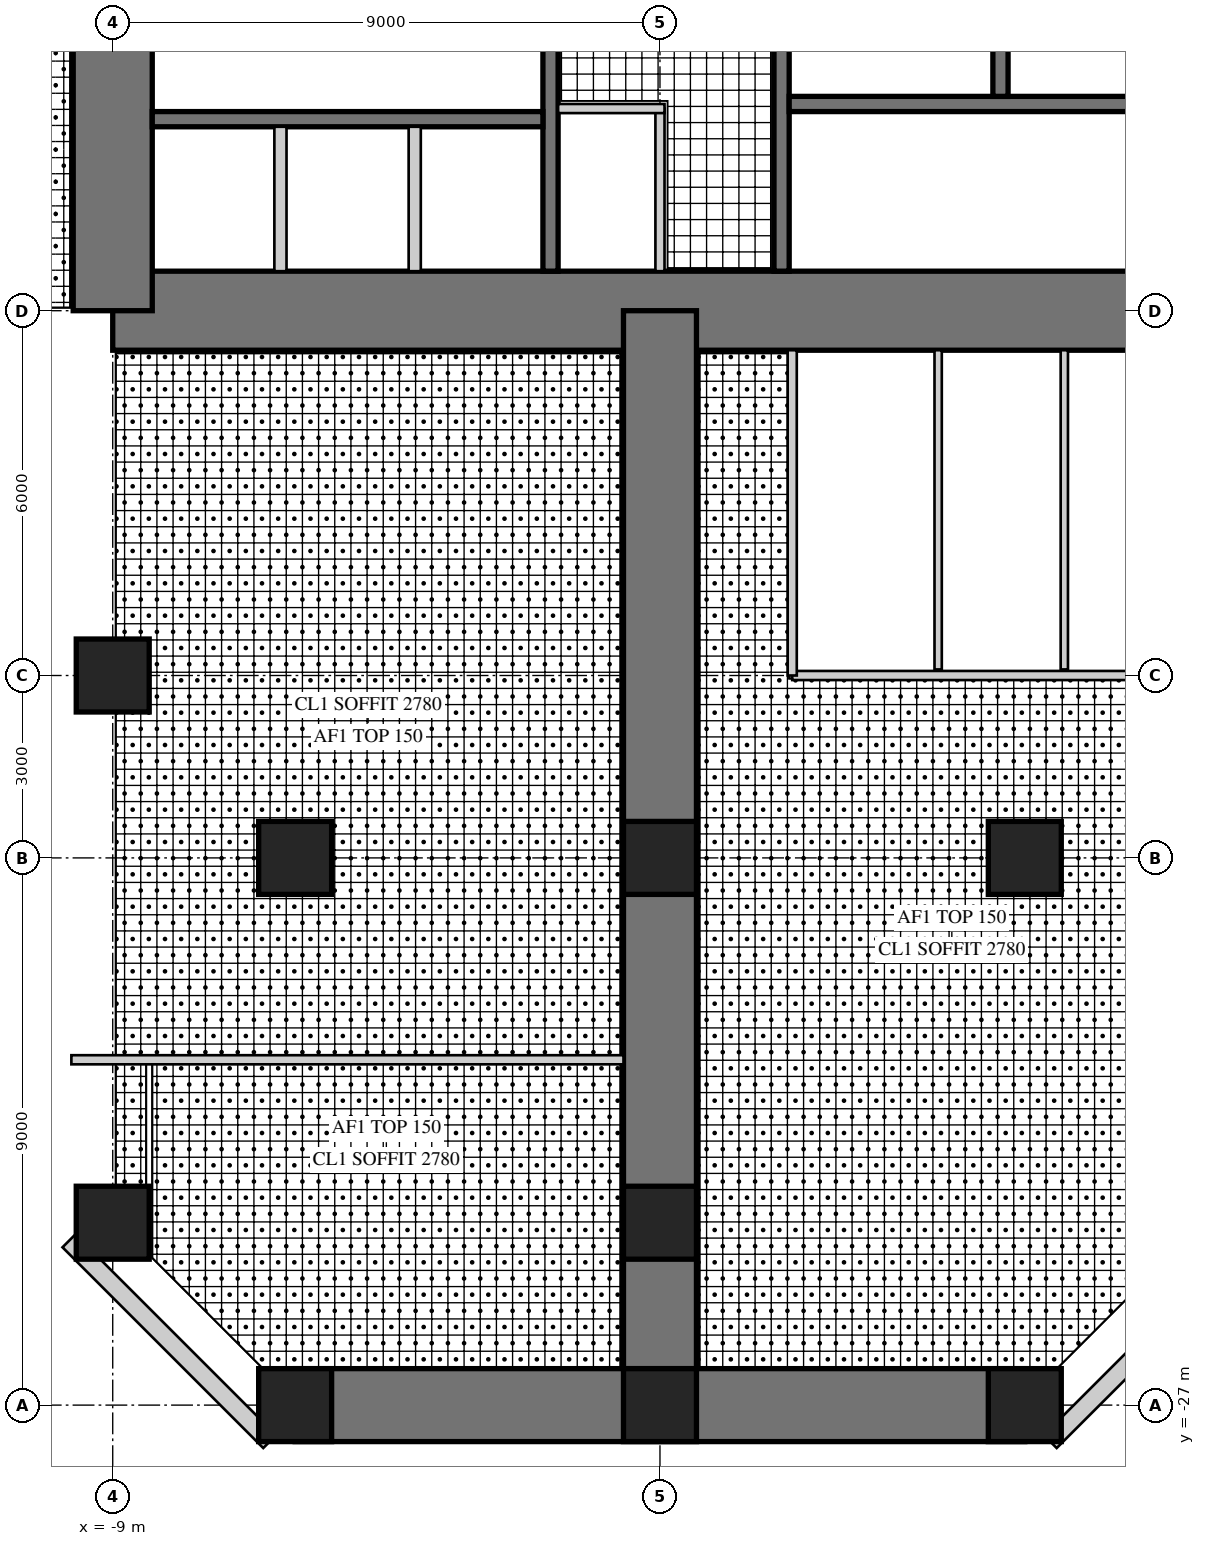
"""IFC4 building model, lengths in metres.
Left out: names, types, materials, properties, quantities, classifications, styles, units other than length and angle.
Written with IfcOpenShell. Run it as: python <this file> out.ifc"""

import sys

from ifc_helpers import new_model, si_unit, direction, frame, frame_2d, origin, origin_2d, place, context, subcontext, project, spatial, rectangle, hollow_rectangle, extrude, element, fill, save


model = new_model("IFC4")
c1 = context("Model", 3, precision=1e-05, world=origin(), true_north=direction((0.0, 1.0)))
c2 = subcontext(c1, "Body", "Model", "MODEL_VIEW")
j1 = project(units=[si_unit("LENGTHUNIT", "METRE"), si_unit("PLANEANGLEUNIT", "RADIAN")], contexts=[c1])
p1 = place(None, origin())
s1 = spatial("IfcSite", under=j1, at=p1, CompositionType="ELEMENT")
p2 = place(p1, origin())
s2 = spatial("IfcBuilding", under=s1, at=p2, CompositionType="ELEMENT")
p3 = place(p2, frame((0.0, 0.0, 59.5)))
s3 = spatial("IfcBuildingStorey", under=s2, at=p3, CompositionType="ELEMENT", Elevation=59.5)
p4 = place(p3, frame((-9.0, -9.0, 0.0), z_axis=(0.0, 0.0, 1.0), x_axis=(1.0, 0.0, 0.0)))
e1 = element("IfcWall", 1, at=p4, inside=s3, PredefinedType="SHEAR", context=c2, shape_type="SweptSolid", body=[
    extrude(rectangle(XDim=18.0, YDim=1.3, at=frame_2d((9.0, 0.0))), origin(), (0.0, 0.0, 1.0), 4.0),
])
p5 = place(p4, frame((9.8, 0.0, 0.0)))
e2 = element("IfcOpeningElement", 2, at=p5, cuts=e1, PredefinedType="OPENING", context=c2, shape_type="SweptSolid", body=[
    extrude(rectangle(XDim=1.0, YDim=2.4, at=frame_2d((0.5, 1.2))), frame((0.0, 0.66, 0.0), z_axis=(0.0, -1.0, 0.0), x_axis=(1.0, 0.0, 0.0)), (0.0, 0.0, 1.0), 1.32),
])
p6 = place(p3, frame((-9.0, 9.0, 0.0), z_axis=(0.0, 0.0, 1.0), x_axis=(0.0, -1.0, 0.0)))
e3 = element("IfcWall", 3, at=p6, inside=s3, PredefinedType="SHEAR", context=c2, shape_type="SweptSolid", body=[
    extrude(rectangle(XDim=18.0, YDim=1.3, at=frame_2d((9.0, 0.0))), origin(), (0.0, 0.0, 1.0), 4.0),
])
p7 = place(p6, frame((9.8, 0.0, 0.0)))
e4 = element("IfcOpeningElement", 4, at=p7, cuts=e3, PredefinedType="OPENING", context=c2, shape_type="SweptSolid", body=[
    extrude(rectangle(XDim=1.0, YDim=2.4, at=frame_2d((0.5, 1.2))), frame((0.0, 0.66, 0.0), z_axis=(0.0, -1.0, 0.0), x_axis=(1.0, 0.0, 0.0)), (0.0, 0.0, 1.0), 1.32),
])
p8 = place(p3, frame((-1.8, -1.875, 0.0), z_axis=(0.0, 0.0, 1.0), x_axis=(0.0, -1.0, 0.0)))
e5 = element("IfcWall", 5, at=p8, inside=s3, PredefinedType="SHEAR", context=c2, shape_type="SweptSolid", body=[
    extrude(rectangle(XDim=6.475, YDim=0.25, at=frame_2d((3.238, 0.0))), origin(), (0.0, 0.0, 1.0), 4.0),
])
p9 = place(p8, frame((1.875, 0.0, 0.0)))
e6 = element("IfcOpeningElement", 6, at=p9, cuts=e5, PredefinedType="OPENING", context=c2, shape_type="SweptSolid", body=[
    extrude(rectangle(XDim=1.6, YDim=2.4, at=frame_2d((0.8, 1.2))), frame((0.0, 0.135, 0.0), z_axis=(0.0, -1.0, 0.0), x_axis=(1.0, 0.0, 0.0)), (0.0, 0.0, 1.0), 0.27),
])
p10 = place(p3, frame((-1.925, -5.85, 0.0), z_axis=(0.0, 0.0, 1.0), x_axis=(-1.0, 0.0, 0.0)))
e7 = element("IfcWall", 7, at=p10, inside=s3, PredefinedType="SHEAR", context=c2, shape_type="SweptSolid", body=[
    extrude(rectangle(XDim=6.425, YDim=0.25, at=frame_2d((3.212, 0.0))), origin(), (0.0, 0.0, 1.0), 4.0),
])
for number, where, z_axis, x_axis in (
    (8, (-4.033, -5.975, 0.0), (0.0, 0.0, 1.0), (0.0, -1.0, 0.0)),
    (9, (-6.242, -5.975, 0.0), (0.0, 0.0, 1.0), (0.0, -1.0, 0.0)),
):
    element("IfcWall", number, at=place(p3, frame(where, z_axis=z_axis, x_axis=x_axis)), inside=s3, PredefinedType="PARTITIONING", context=c2, shape_type="SweptSolid", body=[
        extrude(rectangle(XDim=2.375, YDim=0.2, at=frame_2d((1.188, 0.0))), origin(), (0.0, 0.0, 1.0), 4.0),
    ])
p11 = place(p3, frame((2.0, -1.675, 0.0), z_axis=(0.0, 0.0, 1.0), x_axis=(0.0, -1.0, 0.0)))
e10 = element("IfcWall", 10, at=p11, inside=s3, PredefinedType="SHEAR", context=c2, shape_type="SweptSolid", body=[
    extrude(rectangle(XDim=6.675, YDim=0.25, at=frame_2d((3.337, 0.0))), origin(), (0.0, 0.0, 1.0), 4.0),
])
p12 = place(p11, frame((0.725, 0.0, 0.0)))
e11 = element("IfcOpeningElement", 11, at=p12, cuts=e10, PredefinedType="OPENING", context=c2, shape_type="SweptSolid", body=[
    extrude(rectangle(XDim=1.0, YDim=2.1, at=frame_2d((0.5, 1.05))), frame((0.0, 0.135, 0.0), z_axis=(0.0, -1.0, 0.0), x_axis=(1.0, 0.0, 0.0)), (0.0, 0.0, 1.0), 0.27),
])
p13 = place(p3, frame((2.125, -5.6, 0.0), z_axis=(0.0, 0.0, 1.0), x_axis=(1.0, 0.0, 0.0)))
e12 = element("IfcWall", 12, at=p13, inside=s3, PredefinedType="SHEAR", context=c2, shape_type="SweptSolid", body=[
    extrude(rectangle(XDim=6.225, YDim=0.25, at=frame_2d((3.113, 0.0))), origin(), (0.0, 0.0, 1.0), 4.0),
])
p14 = place(p13, frame((0.175, 0.0, 0.0)))
e13 = element("IfcOpeningElement", 13, at=p14, cuts=e12, PredefinedType="OPENING", context=c2, shape_type="SweptSolid", body=[
    extrude(rectangle(XDim=1.0, YDim=2.1, at=frame_2d((0.5, 1.05))), frame((0.0, 0.135, 0.0), z_axis=(0.0, -1.0, 0.0), x_axis=(1.0, 0.0, 0.0)), (0.0, 0.0, 1.0), 0.27),
])
p15 = place(p3, frame((5.6, -1.925, 0.0), z_axis=(0.0, 0.0, 1.0), x_axis=(0.0, -1.0, 0.0)))
e14 = element("IfcWall", 14, at=p15, inside=s3, PredefinedType="SHEAR", context=c2, shape_type="SweptSolid", body=[
    extrude(rectangle(XDim=3.55, YDim=0.25, at=frame_2d((1.775, 0.0))), origin(), (0.0, 0.0, 1.0), 4.0),
])
p16 = place(p15, frame((1.525, 0.0, 0.0)))
e15 = element("IfcOpeningElement", 15, at=p16, cuts=e14, PredefinedType="OPENING", context=c2, shape_type="SweptSolid", body=[
    extrude(rectangle(XDim=1.1, YDim=2.2, at=frame_2d((0.55, 1.1))), frame((0.0, 0.135, 0.0), z_axis=(0.0, -1.0, 0.0), x_axis=(1.0, 0.0, 0.0)), (0.0, 0.0, 1.0), 0.27),
])
p17 = place(p15, frame((0.075, 0.0, 0.0)))
e16 = element("IfcOpeningElement", 16, at=p17, cuts=e14, PredefinedType="OPENING", context=c2, shape_type="SweptSolid", body=[
    extrude(rectangle(XDim=0.8, YDim=2.1, at=frame_2d((0.4, 1.05))), frame((0.0, 0.135, 0.0), z_axis=(0.0, -1.0, 0.0), x_axis=(1.0, 0.0, 0.0)), (0.0, 0.0, 1.0), 0.27),
])
p18 = place(p3, frame((0.0, -9.0, 0.0), z_axis=(0.0, 0.0, 1.0), x_axis=(0.0, -1.0, 0.0)))
e17 = element("IfcWall", 17, at=p18, inside=s3, PredefinedType="SHEAR", context=c2, shape_type="SweptSolid", body=[
    extrude(rectangle(XDim=18.0, YDim=1.2, at=frame_2d((9.0, 0.0))), origin(), (0.0, 0.0, 1.0), 4.0),
])
p19 = place(p18, frame((9.9, 0.0, 0.0)))
e18 = element("IfcOpeningElement", 18, at=p19, cuts=e17, PredefinedType="OPENING", context=c2, shape_type="SweptSolid", body=[
    extrude(rectangle(XDim=1.0, YDim=2.2, at=frame_2d((0.5, 1.1))), frame((0.0, 0.61, 0.0), z_axis=(0.0, -1.0, 0.0), x_axis=(1.0, 0.0, 0.0)), (0.0, 0.0, 1.0), 1.22),
])
p20 = place(p3, frame((-6.0, -27.0, 0.0), z_axis=(0.0, 0.0, 1.0), x_axis=(1.0, 0.0, 0.0)))
e19 = element("IfcWall", 19, at=p20, inside=s3, PredefinedType="SHEAR", context=c2, shape_type="SweptSolid", body=[
    extrude(rectangle(XDim=12.0, YDim=1.2, at=frame_2d((6.0, 0.0))), origin(), (0.0, 0.0, 1.0), 4.0),
])
p21 = place(p20, frame((1.6, 0.0, 0.6)))
e20 = element("IfcOpeningElement", 20, at=p21, cuts=e19, PredefinedType="OPENING", context=c2, shape_type="SweptSolid", body=[
    extrude(rectangle(XDim=3.0, YDim=2.4, at=frame_2d((1.5, 1.2))), frame((0.0, 0.61, 0.0), z_axis=(0.0, -1.0, 0.0), x_axis=(1.0, 0.0, 0.0)), (0.0, 0.0, 1.0), 1.22),
])
p22 = place(p20, frame((7.4, 0.0, 0.6)))
e21 = element("IfcOpeningElement", 21, at=p22, cuts=e19, PredefinedType="OPENING", context=c2, shape_type="SweptSolid", body=[
    extrude(rectangle(XDim=3.0, YDim=2.4, at=frame_2d((1.5, 1.2))), frame((0.0, 0.61, 0.0), z_axis=(0.0, -1.0, 0.0), x_axis=(1.0, 0.0, 0.0)), (0.0, 0.0, 1.0), 1.22),
])
for number, where, z_axis, x_axis in (
    (22, (-9.0, -15.0, 0.0), (0.0, 0.0, 1.0), (1.0, 0.0, 0.0)),
    (23, (-9.0, -24.0, 0.0), (0.0, 0.0, 1.0), (1.0, 0.0, 0.0)),
    (24, (-6.0, -27.0, 0.0), (0.0, 0.0, 1.0), (1.0, 0.0, 0.0)),
    (25, (0.0, -27.0, 0.0), (0.0, 0.0, 1.0), (1.0, 0.0, 0.0)),
    (26, (6.0, -27.0, 0.0), (0.0, 0.0, 1.0), (1.0, 0.0, 0.0)),
    (27, (-6.0, -18.0, 0.0), (0.0, 0.0, 1.0), (1.0, 0.0, 0.0)),
    (28, (0.0, -18.0, 0.0), (0.0, 0.0, 1.0), (1.0, 0.0, 0.0)),
    (29, (6.0, -18.0, 0.0), (0.0, 0.0, 1.0), (1.0, 0.0, 0.0)),
    (30, (0.0, -24.0, 0.0), (0.0, 0.0, 1.0), (1.0, 0.0, 0.0)),
):
    element("IfcColumn", number, at=place(p3, frame(where, z_axis=z_axis, x_axis=x_axis)), inside=s3, PredefinedType="COLUMN", context=c2, shape_type="SweptSolid", body=[
        extrude(rectangle(XDim=1.2, YDim=1.2, at=origin_2d()), origin(), (0.0, 0.0, 1.0), 4.0),
    ])
p23 = place(p3, frame((-9.72, -24.298, 0.0), z_axis=(0.0, 0.0, 1.0), x_axis=(0.707106781187, -0.707106781187, 0.0)))
e31 = element("IfcWall", 31, at=p23, inside=s3, PredefinedType="SOLIDWALL", context=c2, shape_type="SweptSolid", body=[
    extrude(rectangle(XDim=4.669, YDim=0.3, at=frame_2d((2.335, 0.0))), origin(), (0.0, 0.0, 1.0), 3.8),
])
p24 = place(p23, frame((1.885, 0.0, 0.3)))
e32 = element("IfcOpeningElement", 32, at=p24, cuts=e31, PredefinedType="OPENING", context=c2, shape_type="SweptSolid", body=[
    extrude(rectangle(XDim=0.9, YDim=2.4, at=frame_2d((0.45, 1.2))), frame((0.0, 0.16, 0.0), z_axis=(0.0, -1.0, 0.0), x_axis=(1.0, 0.0, 0.0)), (0.0, 0.0, 1.0), 0.32),
])
p25 = place(p3, frame((6.418, -27.6, 0.0), z_axis=(0.0, 0.0, 1.0), x_axis=(0.707106781187, 0.707106781187, 0.0)))
e33 = element("IfcWall", 33, at=p25, inside=s3, PredefinedType="SOLIDWALL", context=c2, shape_type="SweptSolid", body=[
    extrude(rectangle(XDim=4.669, YDim=0.3, at=frame_2d((2.335, 0.0))), origin(), (0.0, 0.0, 1.0), 3.8),
])
p26 = place(p25, frame((1.885, 0.0, 0.3)))
e34 = element("IfcOpeningElement", 34, at=p26, cuts=e33, PredefinedType="OPENING", context=c2, shape_type="SweptSolid", body=[
    extrude(rectangle(XDim=0.9, YDim=2.4, at=frame_2d((0.45, 1.2))), frame((0.0, 0.16, 0.0), z_axis=(0.0, -1.0, 0.0), x_axis=(1.0, 0.0, 0.0)), (0.0, 0.0, 1.0), 0.32),
])
p27 = place(p3, frame((0.0, -5.675, 0.0), z_axis=(0.0, 0.0, 1.0), x_axis=(0.0, -1.0, 0.0)))
e35 = element("IfcWall", 35, at=p27, inside=s3, PredefinedType="PARTITIONING", context=c2, shape_type="SweptSolid", body=[
    extrude(rectangle(XDim=2.675, YDim=0.15, at=frame_2d((1.337, 0.0))), origin(), (0.0, 0.0, 1.0), 3.8),
])
p28 = place(p27, frame((0.4, 0.0, 0.0)))
e36 = element("IfcOpeningElement", 36, at=p28, cuts=e35, PredefinedType="OPENING", context=c2, shape_type="SweptSolid", body=[
    extrude(rectangle(XDim=1.0, YDim=2.1, at=frame_2d((0.5, 1.05))), frame((0.0, 0.085, 0.0), z_axis=(0.0, -1.0, 0.0), x_axis=(1.0, 0.0, 0.0)), (0.0, 0.0, 1.0), 0.17),
])
p29 = place(p3, frame((-1.675, -5.675, 0.0), z_axis=(0.0, 0.0, 1.0), x_axis=(1.0, 0.0, 0.0)))
e37 = element("IfcWall", 37, at=p29, inside=s3, PredefinedType="PARTITIONING", context=c2, shape_type="SweptSolid", body=[
    extrude(rectangle(XDim=1.75, YDim=0.15, at=frame_2d((0.875, 0.0))), origin(), (0.0, 0.0, 1.0), 3.8),
])
p30 = place(p3, frame((2.175, -15.0, 0.0), z_axis=(0.0, 0.0, 1.0), x_axis=(1.0, 0.0, 0.0)))
e38 = element("IfcWall", 38, at=p30, inside=s3, PredefinedType="PARTITIONING", context=c2, shape_type="SweptSolid", body=[
    extrude(rectangle(XDim=6.225, YDim=0.15, at=frame_2d((3.112, 0.0))), origin(), (0.0, 0.0, 1.0), 2.95),
])
p31 = place(p30, frame((0.7, 0.0, 0.0)))
e39 = element("IfcOpeningElement", 39, at=p31, cuts=e38, PredefinedType="OPENING", context=c2, shape_type="SweptSolid", body=[
    extrude(rectangle(XDim=1.0, YDim=2.1, at=frame_2d((0.5, 1.05))), frame((0.0, 0.085, 0.0), z_axis=(0.0, -1.0, 0.0), x_axis=(1.0, 0.0, 0.0)), (0.0, 0.0, 1.0), 0.17),
])
p32 = place(p30, frame((2.938, 0.0, 0.0)))
e40 = element("IfcOpeningElement", 40, at=p32, cuts=e38, PredefinedType="OPENING", context=c2, shape_type="SweptSolid", body=[
    extrude(rectangle(XDim=1.0, YDim=2.1, at=frame_2d((0.5, 1.05))), frame((0.0, 0.085, 0.0), z_axis=(0.0, -1.0, 0.0), x_axis=(1.0, 0.0, 0.0)), (0.0, 0.0, 1.0), 0.17),
])
p33 = place(p30, frame((4.85, 0.0, 0.0)))
e41 = element("IfcOpeningElement", 41, at=p33, cuts=e38, PredefinedType="OPENING", context=c2, shape_type="SweptSolid", body=[
    extrude(rectangle(XDim=1.0, YDim=2.1, at=frame_2d((0.5, 1.05))), frame((0.0, 0.085, 0.0), z_axis=(0.0, -1.0, 0.0), x_axis=(1.0, 0.0, 0.0)), (0.0, 0.0, 1.0), 0.17),
])
p34 = place(p3, frame((2.175, -9.65, 0.0), z_axis=(0.0, 0.0, 1.0), x_axis=(0.0, -1.0, 0.0)))
e42 = element("IfcWall", 42, at=p34, inside=s3, PredefinedType="PARTITIONING", context=c2, shape_type="SweptSolid", body=[
    extrude(rectangle(XDim=5.35, YDim=0.15, at=frame_2d((2.675, 0.0))), origin(), (0.0, 0.0, 1.0), 3.8),
])
for number, where, z_axis, x_axis in (
    (43, (4.575, -9.65, 0.0), (0.0, 0.0, 1.0), (0.0, -1.0, 0.0)),
    (44, (6.65, -9.65, 0.0), (0.0, 0.0, 1.0), (0.0, -1.0, 0.0)),
):
    element("IfcWall", number, at=place(p3, frame(where, z_axis=z_axis, x_axis=x_axis)), inside=s3, PredefinedType="PLUMBINGWALL", context=c2, shape_type="SweptSolid", body=[
        extrude(rectangle(XDim=5.25, YDim=0.12, at=frame_2d((2.625, 0.0))), origin(), (0.0, 0.0, 1.0), 3.8),
    ])
p35 = place(p3, frame((-9.68, -21.32, 0.0), z_axis=(0.0, 0.0, 1.0), x_axis=(1.0, 0.0, 0.0)))
e45 = element("IfcWall", 45, at=p35, inside=s3, PredefinedType="PARTITIONING", context=c2, shape_type="SweptSolid", body=[
    extrude(rectangle(XDim=9.08, YDim=0.15, at=frame_2d((4.54, 0.0))), origin(), (0.0, 0.0, 1.0), 3.8),
])
p36 = place(p35, frame((7.63, 0.0, 0.0)))
e46 = element("IfcOpeningElement", 46, at=p36, cuts=e45, PredefinedType="OPENING", context=c2, shape_type="SweptSolid", body=[
    extrude(rectangle(XDim=1.0, YDim=2.2, at=frame_2d((0.5, 1.1))), frame((0.0, 0.085, 0.0), z_axis=(0.0, -1.0, 0.0), x_axis=(1.0, 0.0, 0.0)), (0.0, 0.0, 1.0), 0.17),
])
p37 = place(p24, origin())
e47 = element("IfcWindow", 47, at=p37, inside=s3, PartitioningType="SINGLE_PANEL", PredefinedType="WINDOW", context=c2, shape_type="SweptSolid", body=[
    extrude(hollow_rectangle(XDim=0.9, YDim=2.4, WallThickness=0.06, at=frame_2d((0.45, 1.2))), frame((0.0, 0.03, 0.0), z_axis=(0.0, -1.0, 0.0), x_axis=(1.0, 0.0, 0.0)), (0.0, 0.0, 1.0), 0.06),
    extrude(rectangle(XDim=0.779, YDim=2.279, at=frame_2d((0.45, 1.2))), frame((0.0, 0.03, 0.0), z_axis=(0.0, -1.0, 0.0), x_axis=(1.0, 0.0, 0.0)), (0.0, 0.0, 1.0), 0.06),
])
fill(e32, e47)
p38 = place(p21, origin())
e48 = element("IfcWindow", 48, at=p38, inside=s3, PartitioningType="SINGLE_PANEL", PredefinedType="WINDOW", context=c2, shape_type="SweptSolid", body=[
    extrude(hollow_rectangle(XDim=3.0, YDim=2.4, WallThickness=0.06, at=frame_2d((1.5, 1.2))), frame((0.0, 0.03, 0.0), z_axis=(0.0, -1.0, 0.0), x_axis=(1.0, 0.0, 0.0)), (0.0, 0.0, 1.0), 0.06),
    extrude(rectangle(XDim=2.879, YDim=2.279, at=frame_2d((1.5, 1.2))), frame((0.0, 0.03, 0.0), z_axis=(0.0, -1.0, 0.0), x_axis=(1.0, 0.0, 0.0)), (0.0, 0.0, 1.0), 0.06),
])
fill(e20, e48)
p39 = place(p22, origin())
e49 = element("IfcWindow", 49, at=p39, inside=s3, PartitioningType="SINGLE_PANEL", PredefinedType="WINDOW", context=c2, shape_type="SweptSolid", body=[
    extrude(hollow_rectangle(XDim=3.0, YDim=2.4, WallThickness=0.06, at=frame_2d((1.5, 1.2))), frame((0.0, 0.03, 0.0), z_axis=(0.0, -1.0, 0.0), x_axis=(1.0, 0.0, 0.0)), (0.0, 0.0, 1.0), 0.06),
    extrude(rectangle(XDim=2.879, YDim=2.279, at=frame_2d((1.5, 1.2))), frame((0.0, 0.03, 0.0), z_axis=(0.0, -1.0, 0.0), x_axis=(1.0, 0.0, 0.0)), (0.0, 0.0, 1.0), 0.06),
])
fill(e21, e49)
p40 = place(p28, frame((1.0, 0.0, 0.0), z_axis=(0.0, 0.0, 1.0), x_axis=(-1.0, 0.0, 0.0)))
e50 = element("IfcDoor", 50, at=p40, inside=s3, OperationType="SINGLE_SWING_RIGHT", PredefinedType="DOOR", context=c2, shape_type="SweptSolid", body=[
    extrude(rectangle(XDim=1.0, YDim=2.1, at=frame_2d((0.5, 1.05))), frame((0.0, 0.025, 0.0), z_axis=(0.0, -1.0, 0.0), x_axis=(1.0, 0.0, 0.0)), (0.0, 0.0, 1.0), 0.05),
])
fill(e36, e50)
p41 = place(p31, origin())
e51 = element("IfcDoor", 51, at=p41, inside=s3, OperationType="SINGLE_SWING_LEFT", PredefinedType="DOOR", context=c2, shape_type="SweptSolid", body=[
    extrude(rectangle(XDim=1.0, YDim=2.1, at=frame_2d((0.5, 1.05))), frame((0.0, 0.025, 0.0), z_axis=(0.0, -1.0, 0.0), x_axis=(1.0, 0.0, 0.0)), (0.0, 0.0, 1.0), 0.05),
])
fill(e39, e51)
p42 = place(p32, origin())
e52 = element("IfcDoor", 52, at=p42, inside=s3, OperationType="SINGLE_SWING_RIGHT", PredefinedType="DOOR", context=c2, shape_type="SweptSolid", body=[
    extrude(rectangle(XDim=1.0, YDim=2.1, at=frame_2d((0.5, 1.05))), frame((0.0, 0.025, 0.0), z_axis=(0.0, -1.0, 0.0), x_axis=(1.0, 0.0, 0.0)), (0.0, 0.0, 1.0), 0.05),
])
fill(e40, e52)
p43 = place(p33, origin())
e53 = element("IfcDoor", 53, at=p43, inside=s3, OperationType="SINGLE_SWING_LEFT", PredefinedType="DOOR", context=c2, shape_type="SweptSolid", body=[
    extrude(rectangle(XDim=1.0, YDim=2.1, at=frame_2d((0.5, 1.05))), frame((0.0, 0.025, 0.0), z_axis=(0.0, -1.0, 0.0), x_axis=(1.0, 0.0, 0.0)), (0.0, 0.0, 1.0), 0.05),
])
fill(e41, e53)
p44 = place(p36, frame((1.0, 0.0, 0.0), z_axis=(0.0, 0.0, 1.0), x_axis=(-1.0, 0.0, 0.0)))
e54 = element("IfcDoor", 54, at=p44, inside=s3, OperationType="SINGLE_SWING_LEFT", PredefinedType="DOOR", context=c2, shape_type="SweptSolid", body=[
    extrude(rectangle(XDim=1.0, YDim=2.2, at=frame_2d((0.5, 1.1))), frame((0.0, 0.025, 0.0), z_axis=(0.0, -1.0, 0.0), x_axis=(1.0, 0.0, 0.0)), (0.0, 0.0, 1.0), 0.05),
])
fill(e46, e54)
p45 = place(p19, frame((1.0, 0.0, 0.0), z_axis=(0.0, 0.0, 1.0), x_axis=(-1.0, 0.0, 0.0)))
e55 = element("IfcDoor", 55, at=p45, inside=s3, OperationType="SINGLE_SWING_LEFT", PredefinedType="DOOR", context=c2, shape_type="SweptSolid", body=[
    extrude(rectangle(XDim=1.0, YDim=2.2, at=frame_2d((0.5, 1.1))), frame((0.0, 0.025, 0.0), z_axis=(0.0, -1.0, 0.0), x_axis=(1.0, 0.0, 0.0)), (0.0, 0.0, 1.0), 0.05),
])
fill(e18, e55)
p46 = place(p5, frame((1.0, 0.0, 0.0), z_axis=(0.0, 0.0, 1.0), x_axis=(-1.0, 0.0, 0.0)))
e56 = element("IfcDoor", 56, at=p46, inside=s3, OperationType="SINGLE_SWING_RIGHT", PredefinedType="DOOR", context=c2, shape_type="SweptSolid", body=[
    extrude(rectangle(XDim=1.0, YDim=2.4, at=frame_2d((0.5, 1.2))), frame((0.0, -0.005, 0.0), z_axis=(0.0, -1.0, 0.0), x_axis=(1.0, 0.0, 0.0)), (0.0, 0.0, 1.0), 0.05),
])
fill(e2, e56)
p47 = place(p9, frame((1.6, 0.0, 0.0), z_axis=(0.0, 0.0, 1.0), x_axis=(-1.0, 0.0, 0.0)))
e57 = element("IfcDoor", 57, at=p47, inside=s3, OperationType="DOUBLE_DOOR_SINGLE_SWING", PredefinedType="DOOR", context=c2, shape_type="SweptSolid", body=[
    extrude(rectangle(XDim=1.6, YDim=2.4, at=frame_2d((0.8, 1.2))), frame((0.0, 0.025, 0.0), z_axis=(0.0, -1.0, 0.0), x_axis=(1.0, 0.0, 0.0)), (0.0, 0.0, 1.0), 0.05),
])
fill(e6, e57)
p48 = place(p14, frame((1.0, 0.0, 0.0), z_axis=(0.0, 0.0, 1.0), x_axis=(-1.0, 0.0, 0.0)))
e58 = element("IfcDoor", 58, at=p48, inside=s3, OperationType="SINGLE_SWING_RIGHT", PredefinedType="DOOR", context=c2, shape_type="SweptSolid", body=[
    extrude(rectangle(XDim=1.0, YDim=2.1, at=frame_2d((0.5, 1.05))), frame((0.0, 0.025, 0.0), z_axis=(0.0, -1.0, 0.0), x_axis=(1.0, 0.0, 0.0)), (0.0, 0.0, 1.0), 0.05),
])
fill(e13, e58)
save(model, sys.argv[1])
